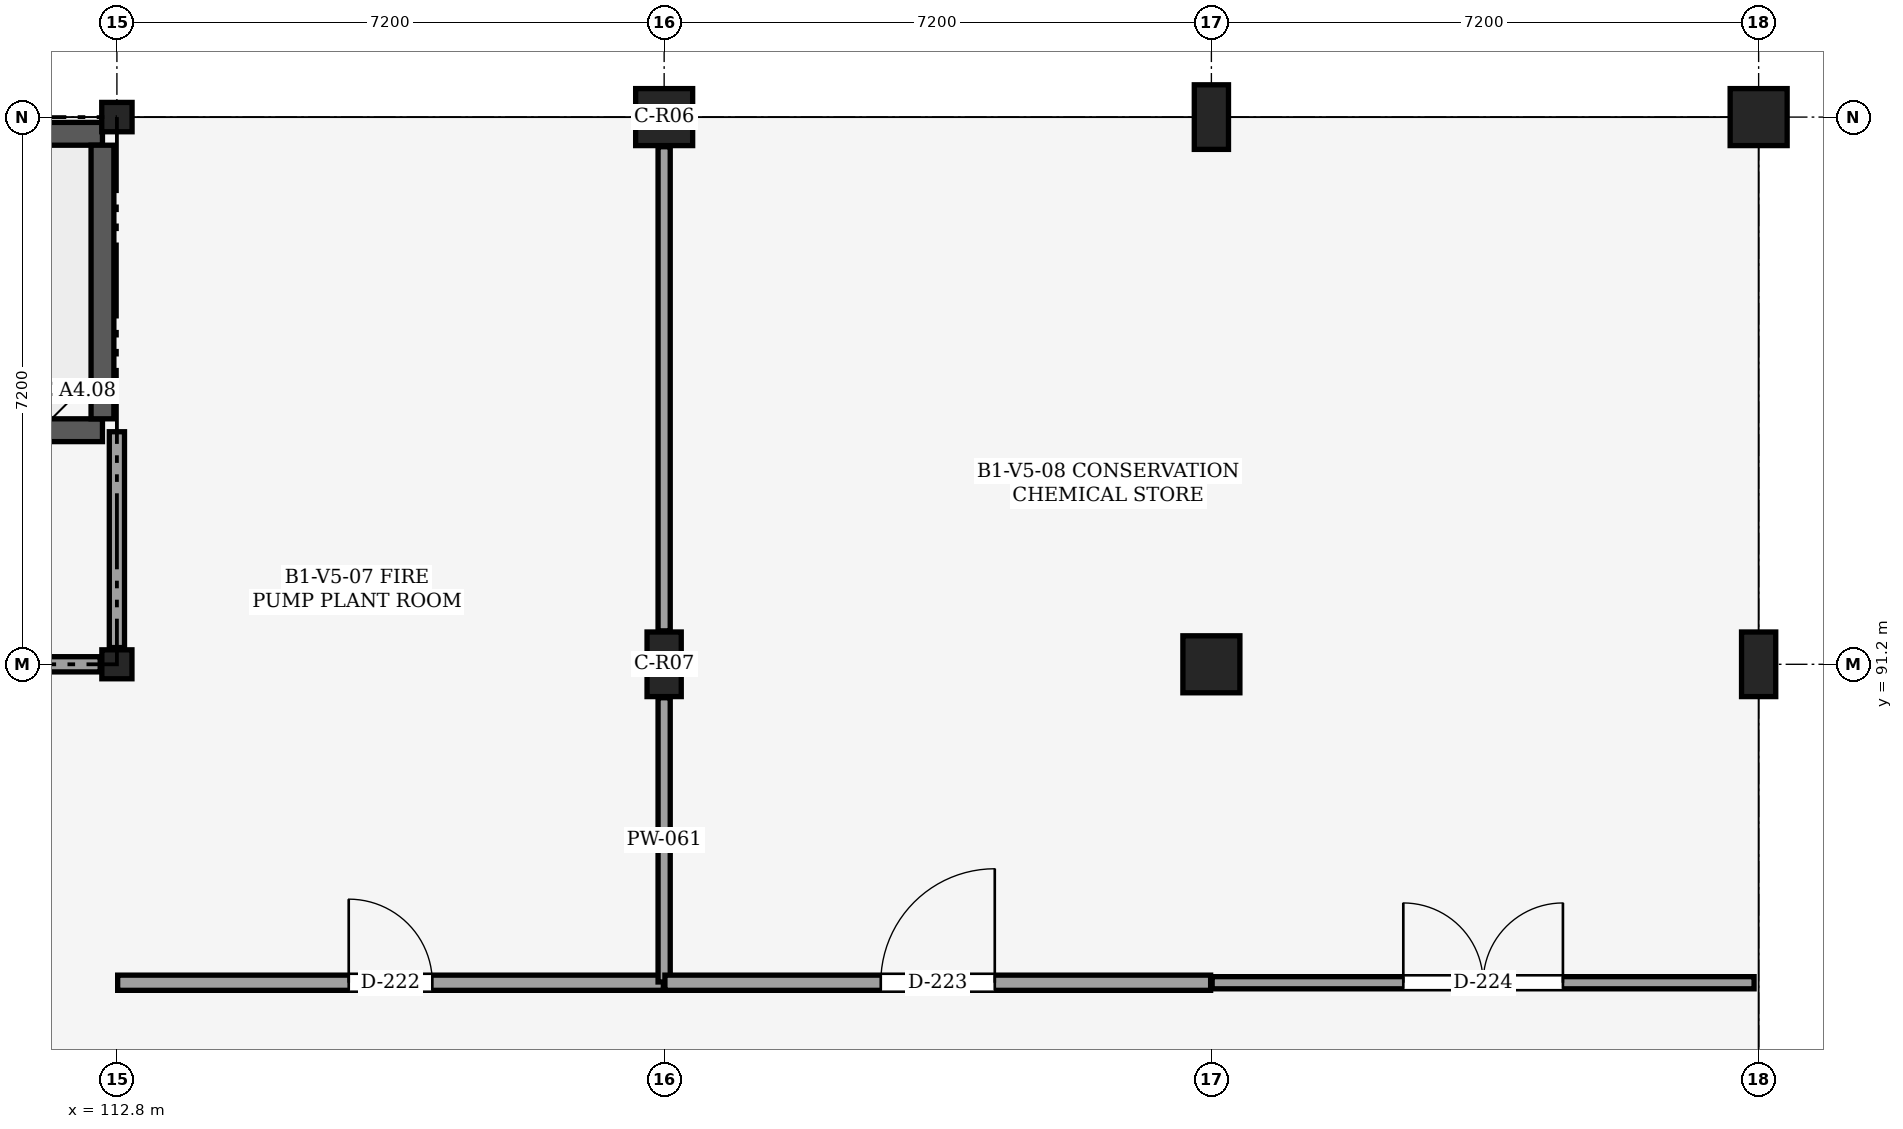
"""IFC4 building model, lengths in metres.
Left out: names, types, materials, properties, quantities, classifications, styles, units other than length and angle.
Written with IfcOpenShell. Run it as: python <this file> out.ifc"""

import sys

from ifc_helpers import new_model, si_unit, direction, frame, frame_2d, origin, origin_2d, place, context, subcontext, project, spatial, rectangle, circle, i_section, extrude, element, fill, save


model = new_model("IFC4")
c1 = context("Model", 3, precision=1e-05, world=origin(), true_north=direction((0.0, 1.0)))
c2 = subcontext(c1, "Body", "Model", "MODEL_VIEW")
j1 = project(units=[si_unit("LENGTHUNIT", "METRE"), si_unit("PLANEANGLEUNIT", "RADIAN")], contexts=[c1])
p1 = place(None, origin())
s1 = spatial("IfcSite", under=j1, at=p1, CompositionType="ELEMENT")
p2 = place(p1, origin())
s2 = spatial("IfcBuilding", under=s1, at=p2, CompositionType="ELEMENT")
p3 = place(p2, frame((0.0, 0.0, -5.4)))
s3 = spatial("IfcBuildingStorey", under=s2, at=p3, CompositionType="ELEMENT", Elevation=-5.4)
p4 = place(p3, frame((112.8, 91.2, 0.0), z_axis=(0.0, 0.0, 1.0), x_axis=(1.0, 0.0, 0.0)))
e1 = element("IfcColumn", 1, at=p4, inside=s3, PredefinedType="COLUMN", context=c2, shape_type="SweptSolid", body=[
    extrude(i_section(OverallWidth=0.396, OverallDepth=0.381, WebThickness=0.019, FlangeThickness=0.03, FilletRadius=0.025, at=origin_2d()), origin(), (0.0, 0.0, 1.0), 5.4),
])
p5 = place(p3, frame((112.8, 98.4, 0.0), z_axis=(0.0, 0.0, 1.0), x_axis=(1.0, 0.0, 0.0)))
e2 = element("IfcColumn", 2, at=p5, inside=s3, PredefinedType="COLUMN", context=c2, shape_type="SweptSolid", body=[
    extrude(i_section(OverallWidth=0.399, OverallDepth=0.386, WebThickness=0.021, FlangeThickness=0.033, FilletRadius=0.025, at=origin_2d()), origin(), (0.0, 0.0, 1.0), 5.4),
])
p6 = place(p3, frame((120.0, 91.2, 0.0), z_axis=(0.0, 0.0, 1.0), x_axis=(1.0, 0.0, 0.0)))
e3 = element("IfcColumn", 3, at=p6, inside=s3, PredefinedType="COLUMN", context=c2, shape_type="SweptSolid", body=[
    extrude(rectangle(XDim=0.45, YDim=0.85, at=origin_2d()), origin(), (0.0, 0.0, 1.0), 5.4),
])
for number, where, z_axis, x_axis in (
    (4, (120.0, 98.4, 0.0), (0.0, 0.0, 1.0), (1.0, 0.0, 0.0)),
    (5, (127.2, 91.2, 0.0), (0.0, 0.0, 1.0), (1.0, 0.0, 0.0)),
):
    element("IfcColumn", number, at=place(p3, frame(where, z_axis=z_axis, x_axis=x_axis)), inside=s3, PredefinedType="COLUMN", context=c2, shape_type="SweptSolid", body=[
        extrude(circle(Radius=0.375, at=origin_2d()), origin(), (0.0, 0.0, 1.0), 5.4),
    ])
for number, where, z_axis, x_axis in (
    (6, (127.2, 98.4, 0.0), (0.0, 0.0, 1.0), (1.0, 0.0, 0.0)),
    (7, (134.4, 91.2, 0.0), (0.0, 0.0, 1.0), (1.0, 0.0, 0.0)),
):
    element("IfcColumn", number, at=place(p3, frame(where, z_axis=z_axis, x_axis=x_axis)), inside=s3, PredefinedType="COLUMN", context=c2, shape_type="SweptSolid", body=[
        extrude(rectangle(XDim=0.45, YDim=0.85, at=origin_2d()), origin(), (0.0, 0.0, 1.0), 5.4),
    ])
p7 = place(p3, frame((134.4, 98.4, 0.0), z_axis=(0.0, 0.0, 1.0), x_axis=(1.0, 0.0, 0.0)))
e8 = element("IfcColumn", 8, at=p7, inside=s3, PredefinedType="COLUMN", context=c2, shape_type="SweptSolid", body=[
    extrude(circle(Radius=0.375, at=origin_2d()), origin(), (0.0, 0.0, 1.0), 5.4),
])
p8 = place(p3, frame((104.59, 94.28, 0.0), z_axis=(0.0, 0.0, 1.0), x_axis=(1.0, 0.0, 0.0)))
e9 = element("IfcWall", 9, at=p8, inside=s3, PredefinedType="SHEAR", context=c2, shape_type="SweptSolid", body=[
    extrude(rectangle(XDim=8.02, YDim=0.3, at=frame_2d((4.01, 0.0))), origin(), (0.0, 0.0, 1.0), 5.12),
])
p9 = place(p8, frame((0.45, 0.0, 0.0)))
e10 = element("IfcOpeningElement", 10, at=p9, cuts=e9, PredefinedType="OPENING", context=c2, shape_type="SweptSolid", body=[
    extrude(rectangle(XDim=1.1, YDim=2.15, at=frame_2d((0.55, 1.075))), frame((0.0, 0.16, 0.0), z_axis=(0.0, -1.0, 0.0), x_axis=(1.0, 0.0, 0.0)), (0.0, 0.0, 1.0), 0.321),
])
p10 = place(p3, frame((104.59, 98.18, 0.0), z_axis=(0.0, 0.0, 1.0), x_axis=(1.0, 0.0, 0.0)))
e11 = element("IfcWall", 11, at=p10, inside=s3, PredefinedType="SHEAR", context=c2, shape_type="SweptSolid", body=[
    extrude(rectangle(XDim=8.02, YDim=0.3, at=frame_2d((4.01, 0.0))), origin(), (0.0, 0.0, 1.0), 5.12),
])
p11 = place(p3, frame((112.61, 94.43, 0.0), z_axis=(0.0, 0.0, 1.0), x_axis=(0.0, 1.0, 0.0)))
e12 = element("IfcWall", 12, at=p11, inside=s3, PredefinedType="SHEAR", context=c2, shape_type="SweptSolid", body=[
    extrude(rectangle(XDim=3.6, YDim=0.3, at=frame_2d((1.8, 0.0))), origin(), (0.0, 0.0, 1.0), 5.12),
])
p12 = place(p3, frame((112.8, 91.42, 0.0), z_axis=(0.0, 0.0, 1.0), x_axis=(0.0, 1.0, 0.0)))
e13 = element("IfcWall", 13, at=p12, inside=s3, PredefinedType="PARTITIONING", context=c2, shape_type="SweptSolid", body=[
    extrude(rectangle(XDim=2.84, YDim=0.2, at=frame_2d((1.42, 0.0))), origin(), (0.0, 0.0, 1.0), 4.568),
])
p13 = place(p3, frame((104.62, 91.2, 0.0), z_axis=(0.0, 0.0, 1.0), x_axis=(1.0, 0.0, 0.0)))
e14 = element("IfcWall", 14, at=p13, inside=s3, PredefinedType="PARTITIONING", context=c2, shape_type="SweptSolid", body=[
    extrude(rectangle(XDim=7.96, YDim=0.2, at=frame_2d((3.98, 0.0))), origin(), (0.0, 0.0, 1.0), 4.418),
])
p14 = place(p13, frame((3.255, 0.0, 0.0)))
e15 = element("IfcOpeningElement", 15, at=p14, cuts=e14, PredefinedType="OPENING", context=c2, shape_type="SweptSolid", body=[
    extrude(rectangle(XDim=1.45, YDim=2.2, at=frame_2d((0.725, 1.1))), frame((0.0, 0.11, 0.0), z_axis=(0.0, -1.0, 0.0), x_axis=(1.0, 0.0, 0.0)), (0.0, 0.0, 1.0), 0.22),
])
p15 = place(p3, frame((112.81, 87.01, 0.0), z_axis=(0.0, 0.0, 1.0), x_axis=(1.0, 0.0, 0.0)))
e16 = element("IfcWall", 16, at=p15, inside=s3, PredefinedType="PARTITIONING", context=c2, shape_type="SweptSolid", body=[
    extrude(rectangle(XDim=7.18, YDim=0.2, at=frame_2d((3.59, 0.0))), origin(), (0.0, 0.0, 1.0), 5.1),
])
p16 = place(p15, frame((3.04, 0.0, 0.0)))
e17 = element("IfcOpeningElement", 17, at=p16, cuts=e16, PredefinedType="OPENING", context=c2, shape_type="SweptSolid", body=[
    extrude(rectangle(XDim=1.1, YDim=2.15, at=frame_2d((0.55, 1.075))), frame((0.0, 0.11, 0.0), z_axis=(0.0, -1.0, 0.0), x_axis=(1.0, 0.0, 0.0)), (0.0, 0.0, 1.0), 0.22),
])
p17 = place(p3, frame((120.0, 87.02, 0.0), z_axis=(0.0, 0.0, 1.0), x_axis=(0.0, 1.0, 0.0)))
e18 = element("IfcWall", 18, at=p17, inside=s3, PredefinedType="PARTITIONING", context=c2, shape_type="SweptSolid", body=[
    extrude(rectangle(XDim=3.74, YDim=0.16, at=frame_2d((1.87, 0.0))), origin(), (0.0, 0.0, 1.0), 4.568),
])
p18 = place(p3, frame((120.0, 91.64, 0.0), z_axis=(0.0, 0.0, 1.0), x_axis=(0.0, 1.0, 0.0)))
e19 = element("IfcWall", 19, at=p18, inside=s3, PredefinedType="PARTITIONING", context=c2, shape_type="SweptSolid", body=[
    extrude(rectangle(XDim=6.37, YDim=0.16, at=frame_2d((3.185, 0.0))), origin(), (0.0, 0.0, 1.0), 4.418),
])
p19 = place(p3, frame((120.01, 87.01, 0.0), z_axis=(0.0, 0.0, 1.0), x_axis=(1.0, 0.0, 0.0)))
e20 = element("IfcWall", 20, at=p19, inside=s3, PredefinedType="PARTITIONING", context=c2, shape_type="SweptSolid", body=[
    extrude(rectangle(XDim=7.18, YDim=0.2, at=frame_2d((3.59, 0.0))), origin(), (0.0, 0.0, 1.0), 5.1),
])
p20 = place(p19, frame((2.84, 0.0, 0.0)))
e21 = element("IfcOpeningElement", 21, at=p20, cuts=e20, PredefinedType="OPENING", context=c2, shape_type="SweptSolid", body=[
    extrude(rectangle(XDim=1.5, YDim=2.2, at=frame_2d((0.75, 1.1))), frame((0.0, 0.11, 0.0), z_axis=(0.0, -1.0, 0.0), x_axis=(1.0, 0.0, 0.0)), (0.0, 0.0, 1.0), 0.22),
])
p21 = place(p3, frame((127.21, 87.01, 0.0), z_axis=(0.0, 0.0, 1.0), x_axis=(1.0, 0.0, 0.0)))
e22 = element("IfcWall", 22, at=p21, inside=s3, PredefinedType="PARTITIONING", context=c2, shape_type="SweptSolid", body=[
    extrude(rectangle(XDim=7.13, YDim=0.16, at=frame_2d((3.565, 0.0))), origin(), (0.0, 0.0, 1.0), 5.1),
])
p22 = place(p21, frame((2.515, 0.0, 0.0)))
e23 = element("IfcOpeningElement", 23, at=p22, cuts=e22, PredefinedType="OPENING", context=c2, shape_type="SweptSolid", body=[
    extrude(rectangle(XDim=2.1, YDim=2.5, at=frame_2d((1.05, 1.25))), frame((0.0, 0.09, 0.0), z_axis=(0.0, -1.0, 0.0), x_axis=(1.0, 0.0, 0.0)), (0.0, 0.0, 1.0), 0.18),
])
p23 = place(p16, origin())
e24 = element("IfcDoor", 24, at=p23, inside=s3, OperationType="SINGLE_SWING_LEFT", PredefinedType="DOOR", context=c2, shape_type="SweptSolid", body=[
    extrude(rectangle(XDim=1.1, YDim=2.15, at=frame_2d((0.55, 1.075))), frame((0.0, 0.025, 0.0), z_axis=(0.0, -1.0, 0.0), x_axis=(1.0, 0.0, 0.0)), (0.0, 0.0, 1.0), 0.05),
])
fill(e17, e24)
p24 = place(p20, origin())
e25 = element("IfcDoor", 25, at=p24, inside=s3, OperationType="SINGLE_SWING_RIGHT", PredefinedType="DOOR", context=c2, shape_type="SweptSolid", body=[
    extrude(rectangle(XDim=1.5, YDim=2.2, at=frame_2d((0.75, 1.1))), frame((0.0, 0.025, 0.0), z_axis=(0.0, -1.0, 0.0), x_axis=(1.0, 0.0, 0.0)), (0.0, 0.0, 1.0), 0.05),
])
fill(e21, e25)
p25 = place(p22, origin())
e26 = element("IfcDoor", 26, at=p25, inside=s3, OperationType="DOUBLE_DOOR_SINGLE_SWING", PredefinedType="DOOR", context=c2, shape_type="SweptSolid", body=[
    extrude(rectangle(XDim=2.1, YDim=2.5, at=frame_2d((1.05, 1.25))), frame((0.0, 0.025, 0.0), z_axis=(0.0, -1.0, 0.0), x_axis=(1.0, 0.0, 0.0)), (0.0, 0.0, 1.0), 0.05),
])
fill(e23, e26)
save(model, sys.argv[1])
